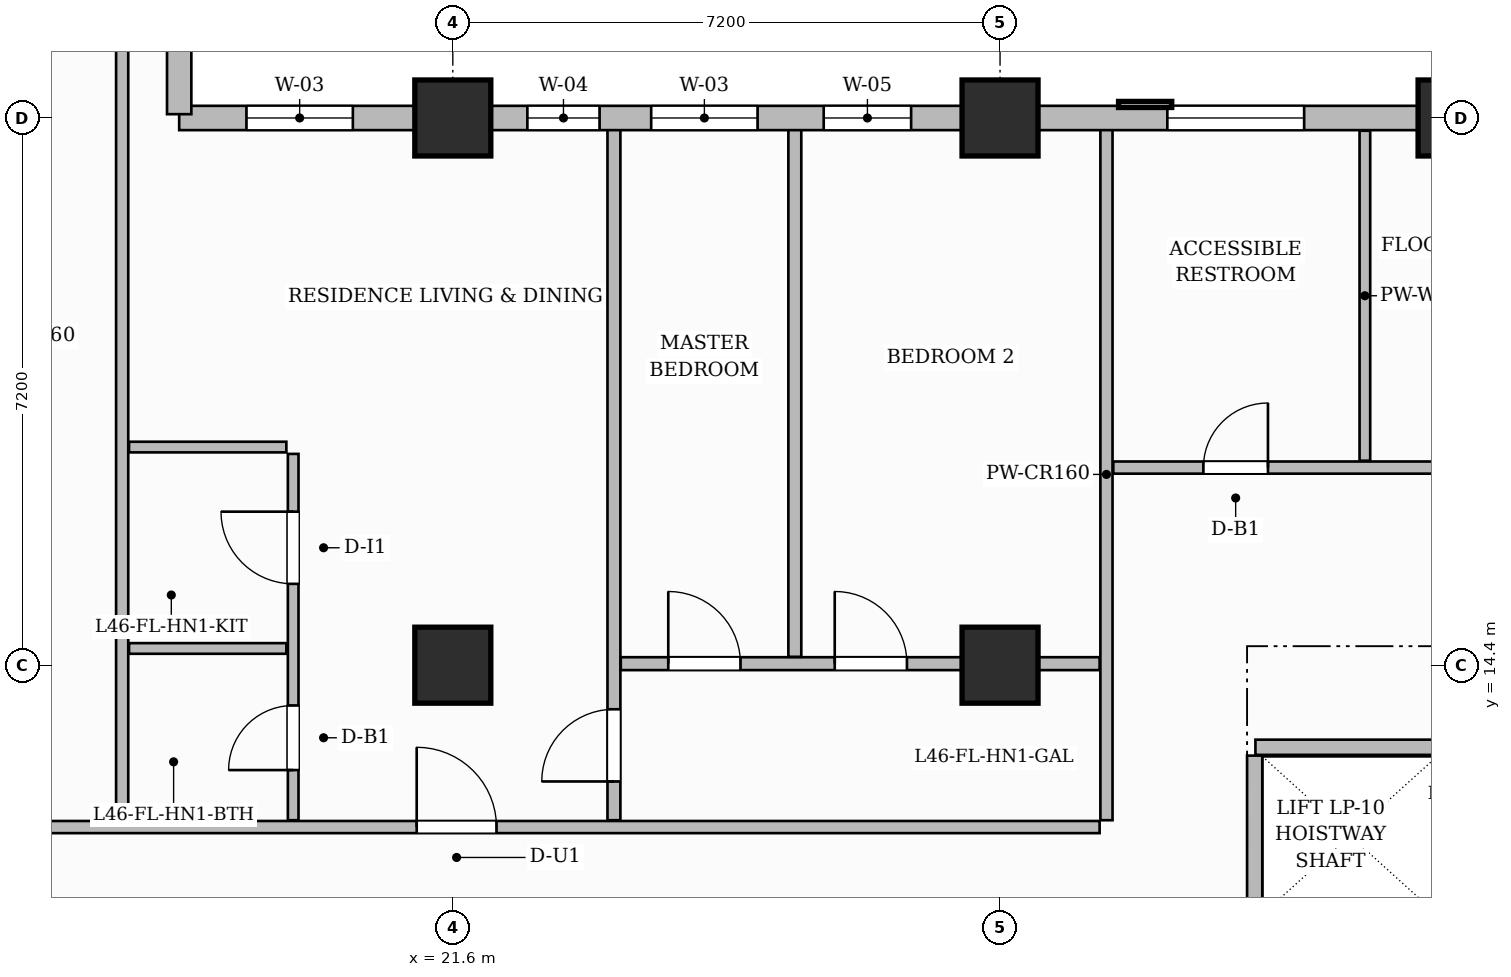
"""IFC4 building model, lengths in metres.
Left out: names, types, materials, properties, quantities, classifications, styles, units other than length and angle.
Written with IfcOpenShell. Run it as: python <this file> out.ifc"""

import sys

from ifc_helpers import new_model, si_unit, direction, frame, frame_2d, origin, origin_2d, place, context, subcontext, project, spatial, rectangle, extrude, source, transform, mapped, element, fill, save


model = new_model("IFC4")
c1 = context("Model", 3, precision=1e-05, world=origin(), true_north=direction((0.0, 1.0)))
c2 = subcontext(c1, "Body", "Model", "MODEL_VIEW")
j1 = project(units=[si_unit("LENGTHUNIT", "METRE"), si_unit("PLANEANGLEUNIT", "RADIAN")], contexts=[c1])
p1 = place(None, origin())
s1 = spatial("IfcSite", under=j1, at=p1, CompositionType="ELEMENT")
p2 = place(p1, origin())
s2 = spatial("IfcBuilding", under=s1, at=p2, CompositionType="ELEMENT")
p3 = place(p2, frame((0.0, 0.0, 184.95)))
s3 = spatial("IfcBuildingStorey", under=s2, at=p3, CompositionType="ELEMENT", Elevation=184.95)
m1 = source(origin(), c2, "Body", "SweptSolid", [
    extrude(rectangle(XDim=1.0, YDim=1.0, at=origin_2d()), origin(), (0.0, 0.0, 1.0), 3.85),
])
for number, where, z_axis, x_axis in (
    (1, (21.6, 14.4, 0.0), (0.0, 0.0, 1.0), (1.0, 0.0, 0.0)),
    (2, (21.6, 21.6, 0.0), (0.0, 0.0, 1.0), (1.0, 0.0, 0.0)),
    (3, (28.8, 14.4, 0.0), (0.0, 0.0, 1.0), (1.0, 0.0, 0.0)),
    (4, (28.8, 21.6, 0.0), (0.0, 0.0, 1.0), (1.0, 0.0, 0.0)),
    (5, (34.8, 21.6, 0.0), (0.0, 0.0, 1.0), (1.0, 0.0, 0.0)),
):
    element("IfcColumn", number, at=place(p3, frame(where, z_axis=z_axis, x_axis=x_axis)), inside=s3, PredefinedType="COLUMN", context=c2, shape_type="MappedRepresentation", body=[
        mapped(m1, transform((0.0, 0.0, 0.0), scale=1.0)),
    ])
p4 = place(p3, frame((32.16, 13.32, 0.0), z_axis=(0.0, 0.0, 1.0), x_axis=(1.0, 0.0, 0.0)))
e6 = element("IfcWall", 6, at=p4, inside=s3, PredefinedType="PARTITIONING", context=c2, shape_type="SweptSolid", body=[
    extrude(rectangle(XDim=2.36, YDim=0.2, at=frame_2d((1.18, 0.0))), origin(), (0.0, 0.0, 1.0), 3.6),
])
p5 = place(p3, frame((32.15, 4.39, 0.0), z_axis=(0.0, 0.0, 1.0), x_axis=(0.0, 1.0, 0.0)))
e7 = element("IfcWall", 7, at=p5, inside=s3, PredefinedType="PARTITIONING", context=c2, shape_type="SweptSolid", body=[
    extrude(rectangle(XDim=8.82, YDim=0.2, at=frame_2d((4.41, 0.0))), origin(), (0.0, 0.0, 1.0), 3.6),
])
p6 = place(p3, frame((14.568, 12.27, 0.0), z_axis=(0.0, 0.0, 1.0), x_axis=(1.0, 0.0, 0.0)))
e8 = element("IfcWall", 8, at=p6, inside=s3, PredefinedType="PARTITIONING", context=c2, shape_type="SweptSolid", body=[
    extrude(rectangle(XDim=15.542, YDim=0.16, at=frame_2d((7.771, 0.0))), origin(), (0.0, 0.0, 1.0), 3.6),
])
p7 = place(p6, frame((6.557, 0.0, 0.0)))
e9 = element("IfcOpeningElement", 9, at=p7, cuts=e8, PredefinedType="OPENING", context=c2, shape_type="SweptSolid", body=[
    extrude(rectangle(XDim=1.05, YDim=2.25, at=frame_2d((0.525, 1.125))), frame((0.0, 0.09, 0.0), z_axis=(0.0, -1.0, 0.0), x_axis=(1.0, 0.0, 0.0)), (0.0, 0.0, 1.0), 0.18),
])
p8 = place(p3, frame((30.2, 12.36, 0.0), z_axis=(0.0, 0.0, 1.0), x_axis=(0.0, 1.0, 0.0)))
e10 = element("IfcWall", 10, at=p8, inside=s3, PredefinedType="PARTITIONING", context=c2, shape_type="SweptSolid", body=[
    extrude(rectangle(XDim=9.1, YDim=0.16, at=frame_2d((4.55, 0.0))), origin(), (0.0, 0.0, 1.0), 3.6),
])
p9 = place(p3, frame((30.29, 17.0, 0.0), z_axis=(0.0, 0.0, 1.0), x_axis=(1.0, 0.0, 0.0)))
e11 = element("IfcWall", 11, at=p9, inside=s3, PredefinedType="PARTITIONING", context=c2, shape_type="SweptSolid", body=[
    extrude(rectangle(XDim=19.37, YDim=0.16, at=frame_2d((9.685, 0.0))), origin(), (0.0, 0.0, 1.0), 3.6),
])
p10 = place(p9, frame((1.185, 0.0, 0.0)))
e12 = element("IfcOpeningElement", 12, at=p10, cuts=e11, PredefinedType="OPENING", context=c2, shape_type="SweptSolid", body=[
    extrude(rectangle(XDim=0.85, YDim=2.1, at=frame_2d((0.425, 1.05))), frame((0.0, 0.09, 0.0), z_axis=(0.0, -1.0, 0.0), x_axis=(1.0, 0.0, 0.0)), (0.0, 0.0, 1.0), 0.18),
])
p11 = place(p9, frame((6.66, 0.0, 0.0)))
e13 = element("IfcOpeningElement", 13, at=p11, cuts=e11, PredefinedType="OPENING", context=c2, shape_type="SweptSolid", body=[
    extrude(rectangle(XDim=0.9, YDim=2.15, at=frame_2d((0.45, 1.075))), frame((0.0, 0.09, 0.0), z_axis=(0.0, -1.0, 0.0), x_axis=(1.0, 0.0, 0.0)), (0.0, 0.0, 1.0), 0.18),
])
p12 = place(p9, frame((14.46, 0.0, 0.0)))
e14 = element("IfcOpeningElement", 14, at=p12, cuts=e11, PredefinedType="OPENING", context=c2, shape_type="SweptSolid", body=[
    extrude(rectangle(XDim=1.4, YDim=2.35, at=frame_2d((0.7, 1.175))), frame((0.0, 0.09, 0.0), z_axis=(0.0, -1.0, 0.0), x_axis=(1.0, 0.0, 0.0)), (0.0, 0.0, 1.0), 0.18),
])
p13 = place(p3, frame((33.6, 17.09, 0.0), z_axis=(0.0, 0.0, 1.0), x_axis=(0.0, 1.0, 0.0)))
e15 = element("IfcWall", 15, at=p13, inside=s3, PredefinedType="PARTITIONING", context=c2, shape_type="SweptSolid", body=[
    extrude(rectangle(XDim=4.342, YDim=0.14, at=frame_2d((2.171, 0.0))), origin(), (0.0, 0.0, 1.0), 3.6),
])
p14 = place(p3, frame((17.25, 12.36, 0.0), z_axis=(0.0, 0.0, 1.0), x_axis=(0.0, 1.0, 0.0)))
e16 = element("IfcWall", 16, at=p14, inside=s3, PredefinedType="PARTITIONING", context=c2, shape_type="SweptSolid", body=[
    extrude(rectangle(XDim=12.75, YDim=0.16, at=frame_2d((6.375, 0.0))), origin(), (0.0, 0.0, 1.0), 3.6),
])
p15 = place(p3, frame((19.5, 12.36, 0.0), z_axis=(0.0, 0.0, 1.0), x_axis=(0.0, 1.0, 0.0)))
e17 = element("IfcWall", 17, at=p15, inside=s3, PredefinedType="PARTITIONING", context=c2, shape_type="SweptSolid", body=[
    extrude(rectangle(XDim=4.82, YDim=0.14, at=frame_2d((2.41, 0.0))), origin(), (0.0, 0.0, 1.0), 3.6),
])
p16 = place(p15, frame((0.66, 0.0, 0.0)))
e18 = element("IfcOpeningElement", 18, at=p16, cuts=e17, PredefinedType="OPENING", context=c2, shape_type="SweptSolid", body=[
    extrude(rectangle(XDim=0.85, YDim=2.1, at=frame_2d((0.425, 1.05))), frame((0.0, 0.08, 0.0), z_axis=(0.0, -1.0, 0.0), x_axis=(1.0, 0.0, 0.0)), (0.0, 0.0, 1.0), 0.16),
])
p17 = place(p15, frame((3.11, 0.0, 0.0)))
e19 = element("IfcOpeningElement", 19, at=p17, cuts=e17, PredefinedType="OPENING", context=c2, shape_type="SweptSolid", body=[
    extrude(rectangle(XDim=0.95, YDim=2.15, at=frame_2d((0.475, 1.075))), frame((0.0, 0.08, 0.0), z_axis=(0.0, -1.0, 0.0), x_axis=(1.0, 0.0, 0.0)), (0.0, 0.0, 1.0), 0.16),
])
p18 = place(p3, frame((17.34, 14.62, 0.0), z_axis=(0.0, 0.0, 1.0), x_axis=(1.0, 0.0, 0.0)))
e20 = element("IfcWall", 20, at=p18, inside=s3, PredefinedType="PARTITIONING", context=c2, shape_type="SweptSolid", body=[
    extrude(rectangle(XDim=2.07, YDim=0.14, at=frame_2d((1.035, 0.0))), origin(), (0.0, 0.0, 1.0), 3.085),
])
p19 = place(p3, frame((17.34, 17.27, 0.0), z_axis=(0.0, 0.0, 1.0), x_axis=(1.0, 0.0, 0.0)))
e21 = element("IfcWall", 21, at=p19, inside=s3, PredefinedType="PARTITIONING", context=c2, shape_type="SweptSolid", body=[
    extrude(rectangle(XDim=2.07, YDim=0.14, at=frame_2d((1.035, 0.0))), origin(), (0.0, 0.0, 1.0), 3.6),
])
p20 = place(p3, frame((23.72, 12.36, 0.0), z_axis=(0.0, 0.0, 1.0), x_axis=(0.0, 1.0, 0.0)))
e22 = element("IfcWall", 22, at=p20, inside=s3, PredefinedType="PARTITIONING", context=c2, shape_type="SweptSolid", body=[
    extrude(rectangle(XDim=9.1, YDim=0.17, at=frame_2d((4.55, 0.0))), origin(), (0.0, 0.0, 1.0), 3.6),
])
p21 = place(p20, frame((0.51, 0.0, 0.0)))
e23 = element("IfcOpeningElement", 23, at=p21, cuts=e22, PredefinedType="OPENING", context=c2, shape_type="SweptSolid", body=[
    extrude(rectangle(XDim=0.95, YDim=2.15, at=frame_2d((0.475, 1.075))), frame((0.0, 0.095, 0.0), z_axis=(0.0, -1.0, 0.0), x_axis=(1.0, 0.0, 0.0)), (0.0, 0.0, 1.0), 0.19),
])
p22 = place(p3, frame((23.81, 14.42, 0.0), z_axis=(0.0, 0.0, 1.0), x_axis=(1.0, 0.0, 0.0)))
e24 = element("IfcWall", 24, at=p22, inside=s3, PredefinedType="PARTITIONING", context=c2, shape_type="SweptSolid", body=[
    extrude(rectangle(XDim=6.3, YDim=0.17, at=frame_2d((3.15, 0.0))), origin(), (0.0, 0.0, 1.0), 2.985),
])
p23 = place(p22, frame((0.625, 0.0, 0.0)))
e25 = element("IfcOpeningElement", 25, at=p23, cuts=e24, PredefinedType="OPENING", context=c2, shape_type="SweptSolid", body=[
    extrude(rectangle(XDim=0.95, YDim=2.15, at=frame_2d((0.475, 1.075))), frame((0.0, 0.095, 0.0), z_axis=(0.0, -1.0, 0.0), x_axis=(1.0, 0.0, 0.0)), (0.0, 0.0, 1.0), 0.19),
])
p24 = place(p22, frame((2.815, 0.0, 0.0)))
e26 = element("IfcOpeningElement", 26, at=p24, cuts=e24, PredefinedType="OPENING", context=c2, shape_type="SweptSolid", body=[
    extrude(rectangle(XDim=0.95, YDim=2.15, at=frame_2d((0.475, 1.075))), frame((0.0, 0.095, 0.0), z_axis=(0.0, -1.0, 0.0), x_axis=(1.0, 0.0, 0.0)), (0.0, 0.0, 1.0), 0.19),
])
p25 = place(p3, frame((26.1, 14.51, 0.0), z_axis=(0.0, 0.0, 1.0), x_axis=(0.0, 1.0, 0.0)))
e27 = element("IfcWall", 27, at=p25, inside=s3, PredefinedType="PARTITIONING", context=c2, shape_type="SweptSolid", body=[
    extrude(rectangle(XDim=6.95, YDim=0.17, at=frame_2d((3.475, 0.0))), origin(), (0.0, 0.0, 1.0), 3.6),
])
p26 = place(p3, frame((18.0, 21.6, 0.0), z_axis=(0.0, 0.0, 1.0), x_axis=(1.0, 0.0, 0.0)))
e28 = element("IfcWall", 28, at=p26, inside=s3, PredefinedType="SOLIDWALL", context=c2, shape_type="SweptSolid", body=[
    extrude(rectangle(XDim=31.8, YDim=0.32, at=frame_2d((15.9, 0.0))), origin(), (0.0, 0.0, 1.0), 3.085),
])
p27 = place(p26, frame((0.885, 0.0, 0.8)))
e29 = element("IfcOpeningElement", 29, at=p27, cuts=e28, PredefinedType="OPENING", context=c2, shape_type="SweptSolid", body=[
    extrude(rectangle(XDim=1.4, YDim=1.85, at=frame_2d((0.7, 0.925))), frame((0.0, 0.17, 0.0), z_axis=(0.0, -1.0, 0.0), x_axis=(1.0, 0.0, 0.0)), (0.0, 0.0, 1.0), 0.34),
])
p28 = place(p26, frame((4.581, 0.0, 0.8)))
e30 = element("IfcOpeningElement", 30, at=p28, cuts=e28, PredefinedType="OPENING", context=c2, shape_type="SweptSolid", body=[
    extrude(rectangle(XDim=0.95, YDim=1.75, at=frame_2d((0.475, 0.875))), frame((0.0, 0.17, 0.0), z_axis=(0.0, -1.0, 0.0), x_axis=(1.0, 0.0, 0.0)), (0.0, 0.0, 1.0), 0.34),
])
p29 = place(p26, frame((6.21, 0.0, 0.8)))
e31 = element("IfcOpeningElement", 31, at=p29, cuts=e28, PredefinedType="OPENING", context=c2, shape_type="SweptSolid", body=[
    extrude(rectangle(XDim=1.4, YDim=1.85, at=frame_2d((0.7, 0.925))), frame((0.0, 0.17, 0.0), z_axis=(0.0, -1.0, 0.0), x_axis=(1.0, 0.0, 0.0)), (0.0, 0.0, 1.0), 0.34),
])
p30 = place(p26, frame((8.48, 0.0, 0.8)))
e32 = element("IfcOpeningElement", 32, at=p30, cuts=e28, PredefinedType="OPENING", context=c2, shape_type="SweptSolid", body=[
    extrude(rectangle(XDim=1.15, YDim=1.8, at=frame_2d((0.575, 0.9))), frame((0.0, 0.17, 0.0), z_axis=(0.0, -1.0, 0.0), x_axis=(1.0, 0.0, 0.0)), (0.0, 0.0, 1.0), 0.34),
])
p31 = place(p26, frame((13.001, 0.0, 0.8)))
e33 = element("IfcOpeningElement", 33, at=p31, cuts=e28, PredefinedType="OPENING", context=c2, shape_type="SweptSolid", body=[
    extrude(rectangle(XDim=1.8, YDim=1.85, at=frame_2d((0.9, 0.925))), frame((0.0, 0.17, 0.0), z_axis=(0.0, -1.0, 0.0), x_axis=(1.0, 0.0, 0.0)), (0.0, 0.0, 1.0), 0.34),
])
p32 = place(p26, frame((18.123, 0.0, 0.8)))
e34 = element("IfcOpeningElement", 34, at=p32, cuts=e28, PredefinedType="OPENING", context=c2, shape_type="SweptSolid", body=[
    extrude(rectangle(XDim=1.8, YDim=1.85, at=frame_2d((0.9, 0.925))), frame((0.0, 0.17, 0.0), z_axis=(0.0, -1.0, 0.0), x_axis=(1.0, 0.0, 0.0)), (0.0, 0.0, 1.0), 0.34),
])
p33 = place(p26, frame((20.869, 0.0, 0.8)))
e35 = element("IfcOpeningElement", 35, at=p33, cuts=e28, PredefinedType="OPENING", context=c2, shape_type="SweptSolid", body=[
    extrude(rectangle(XDim=1.8, YDim=1.85, at=frame_2d((0.9, 0.925))), frame((0.0, 0.17, 0.0), z_axis=(0.0, -1.0, 0.0), x_axis=(1.0, 0.0, 0.0)), (0.0, 0.0, 1.0), 0.34),
])
p34 = place(p26, frame((25.475, 0.0, 0.8)))
e36 = element("IfcOpeningElement", 36, at=p34, cuts=e28, PredefinedType="OPENING", context=c2, shape_type="SweptSolid", body=[
    extrude(rectangle(XDim=1.8, YDim=1.85, at=frame_2d((0.9, 0.925))), frame((0.0, 0.17, 0.0), z_axis=(0.0, -1.0, 0.0), x_axis=(1.0, 0.0, 0.0)), (0.0, 0.0, 1.0), 0.34),
])
p35 = place(p26, frame((28.525, 0.0, 0.8)))
e37 = element("IfcOpeningElement", 37, at=p35, cuts=e28, PredefinedType="OPENING", context=c2, shape_type="SweptSolid", body=[
    extrude(rectangle(XDim=1.8, YDim=1.85, at=frame_2d((0.9, 0.925))), frame((0.0, 0.17, 0.0), z_axis=(0.0, -1.0, 0.0), x_axis=(1.0, 0.0, 0.0)), (0.0, 0.0, 1.0), 0.34),
])
p36 = place(p3, frame((18.0, 21.65, 0.0), z_axis=(0.0, 0.0, 1.0), x_axis=(0.0, 1.0, 0.0)))
e38 = element("IfcWall", 38, at=p36, inside=s3, PredefinedType="SOLIDWALL", context=c2, shape_type="SweptSolid", body=[
    extrude(rectangle(XDim=25.1, YDim=0.32, at=frame_2d((12.55, 0.0))), origin(), (0.0, 0.0, 1.0), 3.6),
])
p37 = place(p36, frame((11.6, 0.0, 0.0)))
e39 = element("IfcOpeningElement", 39, at=p37, cuts=e38, PredefinedType="OPENING", context=c2, shape_type="SweptSolid", body=[
    extrude(rectangle(XDim=1.2, YDim=2.2, at=frame_2d((0.6, 1.1))), frame((0.0, 0.17, 0.0), z_axis=(0.0, -1.0, 0.0), x_axis=(1.0, 0.0, 0.0)), (0.0, 0.0, 1.0), 0.34),
])
p38 = place(p36, frame((1.89, 0.0, 0.8)))
e40 = element("IfcOpeningElement", 40, at=p38, cuts=e38, PredefinedType="OPENING", context=c2, shape_type="SweptSolid", body=[
    extrude(rectangle(XDim=1.8, YDim=1.85, at=frame_2d((0.9, 0.925))), frame((0.0, 0.17, 0.0), z_axis=(0.0, -1.0, 0.0), x_axis=(1.0, 0.0, 0.0)), (0.0, 0.0, 1.0), 0.34),
])
p39 = place(p36, frame((6.63, 0.0, 0.8)))
e41 = element("IfcOpeningElement", 41, at=p39, cuts=e38, PredefinedType="OPENING", context=c2, shape_type="SweptSolid", body=[
    extrude(rectangle(XDim=1.8, YDim=1.85, at=frame_2d((0.9, 0.925))), frame((0.0, 0.17, 0.0), z_axis=(0.0, -1.0, 0.0), x_axis=(1.0, 0.0, 0.0)), (0.0, 0.0, 1.0), 0.34),
])
p40 = place(p36, frame((14.225, 0.0, 0.8)))
e42 = element("IfcOpeningElement", 42, at=p40, cuts=e38, PredefinedType="OPENING", context=c2, shape_type="SweptSolid", body=[
    extrude(rectangle(XDim=1.8, YDim=1.85, at=frame_2d((0.9, 0.925))), frame((0.0, 0.17, 0.0), z_axis=(0.0, -1.0, 0.0), x_axis=(1.0, 0.0, 0.0)), (0.0, 0.0, 1.0), 0.34),
])
p41 = place(p36, frame((19.275, 0.0, 0.8)))
e43 = element("IfcOpeningElement", 43, at=p41, cuts=e38, PredefinedType="OPENING", context=c2, shape_type="SweptSolid", body=[
    extrude(rectangle(XDim=1.8, YDim=1.85, at=frame_2d((0.9, 0.925))), frame((0.0, 0.17, 0.0), z_axis=(0.0, -1.0, 0.0), x_axis=(1.0, 0.0, 0.0)), (0.0, 0.0, 1.0), 0.34),
])
p42 = place(p36, frame((22.025, 0.0, 0.8)))
e44 = element("IfcOpeningElement", 44, at=p42, cuts=e38, PredefinedType="OPENING", context=c2, shape_type="SweptSolid", body=[
    extrude(rectangle(XDim=1.8, YDim=1.85, at=frame_2d((0.9, 0.925))), frame((0.0, 0.17, 0.0), z_axis=(0.0, -1.0, 0.0), x_axis=(1.0, 0.0, 0.0)), (0.0, 0.0, 1.0), 0.34),
])
m2 = source(origin(), c2, "Body", "SweptSolid", [
    extrude(rectangle(XDim=0.85, YDim=2.1, at=frame_2d((0.425, 1.05))), frame((0.0, 0.025, 0.0), z_axis=(0.0, -1.0, 0.0), x_axis=(1.0, 0.0, 0.0)), (0.0, 0.0, 1.0), 0.05),
])
p43 = place(p10, origin())
e45 = element("IfcDoor", 45, at=p43, inside=s3, OperationType="SINGLE_SWING_RIGHT", PredefinedType="DOOR", context=c2, shape_type="MappedRepresentation", body=[
    mapped(m2, transform((0.0, 0.0, 0.0), scale=1.0)),
])
fill(e12, e45)
p44 = place(p16, origin())
e46 = element("IfcDoor", 46, at=p44, inside=s3, OperationType="SINGLE_SWING_LEFT", PredefinedType="DOOR", context=c2, shape_type="MappedRepresentation", body=[
    mapped(m2, transform((0.0, 0.0, 0.0), scale=1.0)),
])
fill(e18, e46)
m3 = source(origin(), c2, "Body", "SweptSolid", [
    extrude(rectangle(XDim=0.95, YDim=2.15, at=frame_2d((0.475, 1.075))), frame((0.0, 0.025, 0.0), z_axis=(0.0, -1.0, 0.0), x_axis=(1.0, 0.0, 0.0)), (0.0, 0.0, 1.0), 0.05),
])
p45 = place(p17, origin())
e47 = element("IfcDoor", 47, at=p45, inside=s3, OperationType="SINGLE_SWING_RIGHT", PredefinedType="DOOR", context=c2, shape_type="MappedRepresentation", body=[
    mapped(m3, transform((0.0, 0.0, 0.0), scale=1.0)),
])
fill(e19, e47)
m4 = source(origin(), c2, "Body", "SweptSolid", [
    extrude(rectangle(XDim=1.05, YDim=2.25, at=frame_2d((0.525, 1.125))), frame((0.0, 0.025, 0.0), z_axis=(0.0, -1.0, 0.0), x_axis=(1.0, 0.0, 0.0)), (0.0, 0.0, 1.0), 0.05),
])
p46 = place(p7, origin())
e48 = element("IfcDoor", 48, at=p46, inside=s3, OperationType="SINGLE_SWING_LEFT", PredefinedType="DOOR", context=c2, shape_type="MappedRepresentation", body=[
    mapped(m4, transform((0.0, 0.0, 0.0), scale=1.0)),
])
fill(e9, e48)
p47 = place(p21, origin())
e49 = element("IfcDoor", 49, at=p47, inside=s3, OperationType="SINGLE_SWING_LEFT", PredefinedType="DOOR", context=c2, shape_type="MappedRepresentation", body=[
    mapped(m3, transform((0.0, 0.0, 0.0), scale=1.0)),
])
fill(e23, e49)
p48 = place(p23, origin())
e50 = element("IfcDoor", 50, at=p48, inside=s3, OperationType="SINGLE_SWING_LEFT", PredefinedType="DOOR", context=c2, shape_type="MappedRepresentation", body=[
    mapped(m3, transform((0.0, 0.0, 0.0), scale=1.0)),
])
fill(e25, e50)
p49 = place(p24, origin())
e51 = element("IfcDoor", 51, at=p49, inside=s3, OperationType="SINGLE_SWING_LEFT", PredefinedType="DOOR", context=c2, shape_type="MappedRepresentation", body=[
    mapped(m3, transform((0.0, 0.0, 0.0), scale=1.0)),
])
fill(e26, e51)
m5 = source(origin(), c2, "Body", "SweptSolid", [
    extrude(rectangle(XDim=1.4, YDim=1.85, at=frame_2d((0.7, 0.925))), frame((0.0, 0.03, 0.0), z_axis=(0.0, -1.0, 0.0), x_axis=(1.0, 0.0, 0.0)), (0.0, 0.0, 1.0), 0.06),
])
p50 = place(p27, origin())
e52 = element("IfcWindow", 52, at=p50, inside=s3, PartitioningType="SINGLE_PANEL", PredefinedType="WINDOW", context=c2, shape_type="MappedRepresentation", body=[
    mapped(m5, transform((0.0, 0.0, 0.0), scale=1.0)),
])
fill(e29, e52)
m6 = source(origin(), c2, "Body", "SweptSolid", [
    extrude(rectangle(XDim=0.95, YDim=1.75, at=frame_2d((0.475, 0.875))), frame((0.0, 0.03, 0.0), z_axis=(0.0, -1.0, 0.0), x_axis=(1.0, 0.0, 0.0)), (0.0, 0.0, 1.0), 0.06),
])
p51 = place(p28, origin())
e53 = element("IfcWindow", 53, at=p51, inside=s3, PartitioningType="SINGLE_PANEL", PredefinedType="WINDOW", context=c2, shape_type="MappedRepresentation", body=[
    mapped(m6, transform((0.0, 0.0, 0.0), scale=1.0)),
])
fill(e30, e53)
p52 = place(p29, origin())
e54 = element("IfcWindow", 54, at=p52, inside=s3, PartitioningType="SINGLE_PANEL", PredefinedType="WINDOW", context=c2, shape_type="MappedRepresentation", body=[
    mapped(m5, transform((0.0, 0.0, 0.0), scale=1.0)),
])
fill(e31, e54)
m7 = source(origin(), c2, "Body", "SweptSolid", [
    extrude(rectangle(XDim=1.15, YDim=1.8, at=frame_2d((0.575, 0.9))), frame((0.0, 0.03, 0.0), z_axis=(0.0, -1.0, 0.0), x_axis=(1.0, 0.0, 0.0)), (0.0, 0.0, 1.0), 0.06),
])
p53 = place(p30, origin())
e55 = element("IfcWindow", 55, at=p53, inside=s3, PartitioningType="SINGLE_PANEL", PredefinedType="WINDOW", context=c2, shape_type="MappedRepresentation", body=[
    mapped(m7, transform((0.0, 0.0, 0.0), scale=1.0)),
])
fill(e32, e55)
m8 = source(origin(), c2, "Body", "SweptSolid", [
    extrude(rectangle(XDim=1.8, YDim=1.85, at=frame_2d((0.9, 0.925))), frame((0.0, 0.03, 0.0), z_axis=(0.0, -1.0, 0.0), x_axis=(1.0, 0.0, 0.0)), (0.0, 0.0, 1.0), 0.06),
])
p54 = place(p31, origin())
e56 = element("IfcWindow", 56, at=p54, inside=s3, PartitioningType="DOUBLE_PANEL_VERTICAL", PredefinedType="WINDOW", context=c2, shape_type="MappedRepresentation", body=[
    mapped(m8, transform((0.0, 0.0, 0.0), scale=1.0)),
])
fill(e33, e56)
save(model, sys.argv[1])
